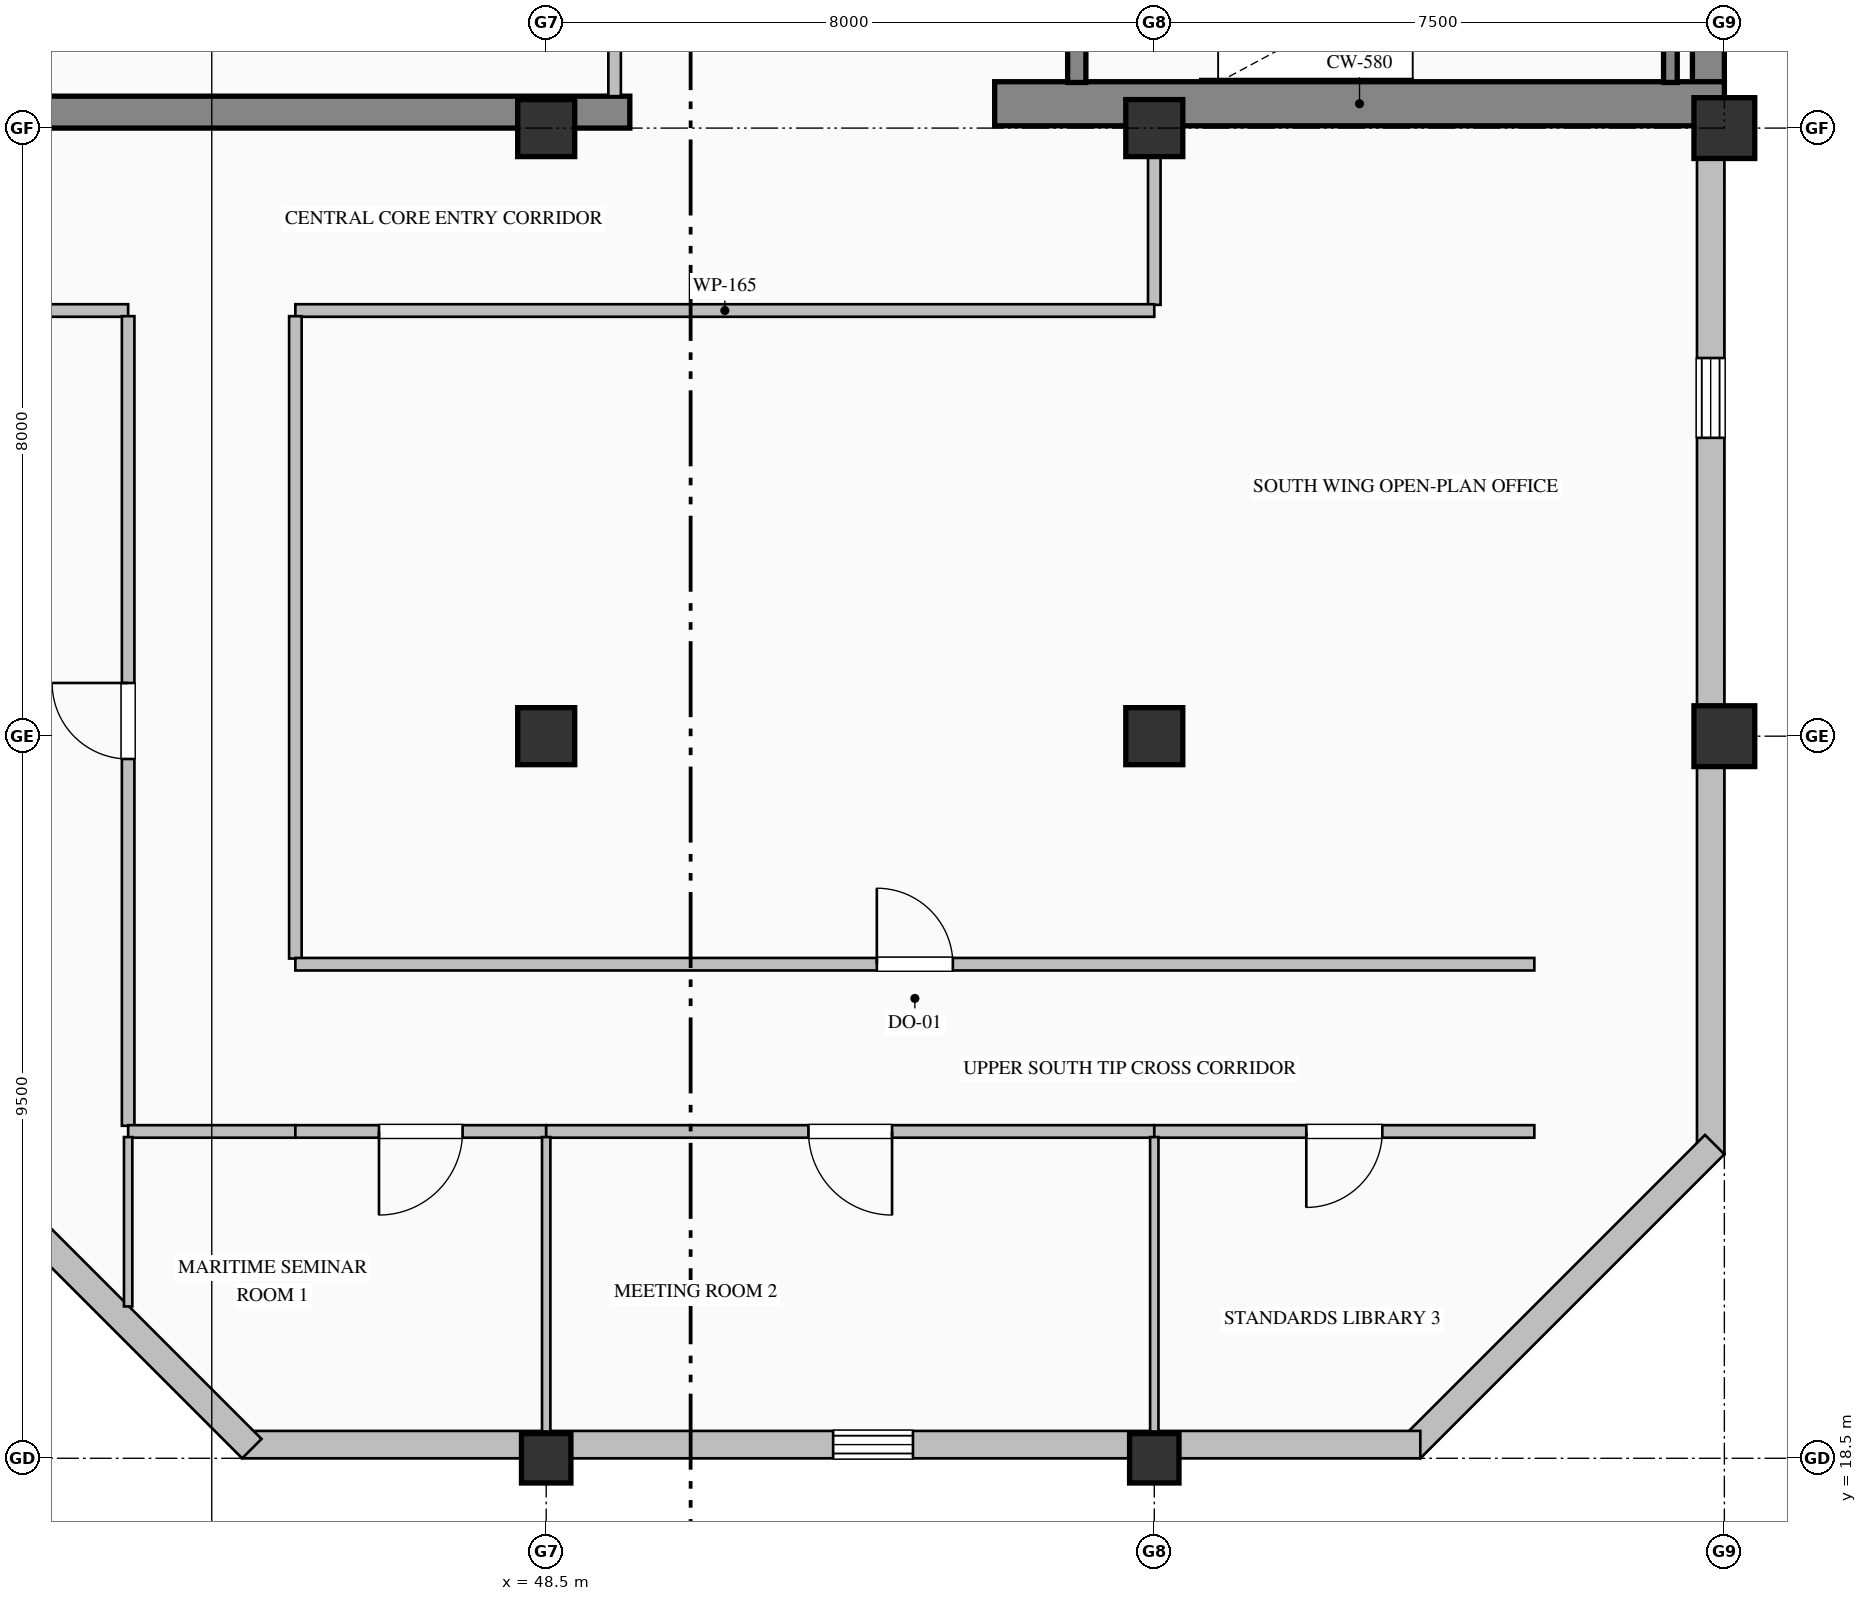
"""IFC4 building model, lengths in metres.
Left out: names, types, materials, properties, quantities, classifications, styles, units other than length and angle.
Written with IfcOpenShell. Run it as: python <this file> out.ifc"""

import sys

from ifc_helpers import new_model, si_unit, direction, frame, frame_2d, origin, origin_2d, place, context, subcontext, project, spatial, rectangle, hollow_rectangle, extrude, element, fill, save


model = new_model("IFC4")
c1 = context("Model", 3, precision=1e-05, world=origin(), true_north=direction((0.0, 1.0)))
c2 = subcontext(c1, "Body", "Model", "MODEL_VIEW")
j1 = project(units=[si_unit("LENGTHUNIT", "METRE"), si_unit("PLANEANGLEUNIT", "RADIAN")], contexts=[c1])
p1 = place(None, origin())
s1 = spatial("IfcSite", under=j1, at=p1, CompositionType="ELEMENT")
p2 = place(p1, origin())
s2 = spatial("IfcBuilding", under=s1, at=p2, CompositionType="ELEMENT")
p3 = place(p2, frame((0.0, 0.0, 303.2)))
s3 = spatial("IfcBuildingStorey", under=s2, at=p3, CompositionType="ELEMENT", Elevation=303.2)
p4 = place(p3, frame((63.79, 36.32, 0.0), z_axis=(0.0, 0.0, 1.0), x_axis=(0.0, 1.0, 0.0)))
e1 = element("IfcWall", 1, at=p4, inside=s3, PredefinedType="SHEAR", context=c2, shape_type="SweptSolid", body=[
    extrude(rectangle(XDim=15.26, YDim=0.42, at=frame_2d((7.63, 0.0))), origin(), (0.0, 0.0, 1.0), 3.785),
])
p5 = place(p3, frame((40.5, 36.21, 0.0), z_axis=(0.0, 0.0, 1.0), x_axis=(1.0, 0.0, 0.0)))
e2 = element("IfcWall", 2, at=p5, inside=s3, PredefinedType="SHEAR", context=c2, shape_type="SweptSolid", body=[
    extrude(rectangle(XDim=9.1, YDim=0.42, at=frame_2d((4.55, 0.0))), origin(), (0.0, 0.0, 1.0), 3.785),
])
p6 = place(p3, frame((54.4, 36.32, 0.0), z_axis=(0.0, 0.0, 1.0), x_axis=(1.0, 0.0, 0.0)))
e3 = element("IfcWall", 3, at=p6, inside=s3, PredefinedType="SHEAR", context=c2, shape_type="SweptSolid", body=[
    extrude(rectangle(XDim=9.6, YDim=0.58, at=frame_2d((4.8, 0.0))), origin(), (0.0, 0.0, 1.0), 4.0),
])
p7 = place(p3, frame((48.5, 18.5, 0.0), z_axis=(0.0, 0.0, 1.0), x_axis=(1.0, 0.0, 0.0)))
e4 = element("IfcColumn", 4, at=p7, inside=s3, PredefinedType="COLUMN", context=c2, shape_type="SweptSolid", body=[
    extrude(hollow_rectangle(XDim=0.65, YDim=0.65, WallThickness=0.028, at=origin_2d()), origin(), (0.0, 0.0, 1.0), 4.0),
])
for number, where, z_axis, x_axis in (
    (5, (48.5, 28.0, 0.0), (0.0, 0.0, 1.0), (1.0, 0.0, 0.0)),
    (6, (48.5, 36.0, 0.0), (0.0, 0.0, 1.0), (1.0, 0.0, 0.0)),
):
    element("IfcColumn", number, at=place(p3, frame(where, z_axis=z_axis, x_axis=x_axis)), inside=s3, PredefinedType="COLUMN", context=c2, shape_type="SweptSolid", body=[
        extrude(rectangle(XDim=0.75, YDim=0.75, at=origin_2d()), origin(), (0.0, 0.0, 1.0), 4.0),
    ])
p8 = place(p3, frame((56.5, 18.5, 0.0), z_axis=(0.0, 0.0, 1.0), x_axis=(1.0, 0.0, 0.0)))
e7 = element("IfcColumn", 7, at=p8, inside=s3, PredefinedType="COLUMN", context=c2, shape_type="SweptSolid", body=[
    extrude(hollow_rectangle(XDim=0.65, YDim=0.65, WallThickness=0.028, at=origin_2d()), origin(), (0.0, 0.0, 1.0), 4.0),
])
for number, where, z_axis, x_axis in (
    (8, (56.5, 28.0, 0.0), (0.0, 0.0, 1.0), (1.0, 0.0, 0.0)),
    (9, (56.5, 36.0, 0.0), (0.0, 0.0, 1.0), (1.0, 0.0, 0.0)),
):
    element("IfcColumn", number, at=place(p3, frame(where, z_axis=z_axis, x_axis=x_axis)), inside=s3, PredefinedType="COLUMN", context=c2, shape_type="SweptSolid", body=[
        extrude(rectangle(XDim=0.75, YDim=0.75, at=origin_2d()), origin(), (0.0, 0.0, 1.0), 4.0),
    ])
for number, where, z_axis, x_axis in (
    (10, (64.0, 28.0, 0.0), (0.0, 0.0, 1.0), (1.0, 0.0, 0.0)),
    (11, (64.0, 36.0, 0.0), (0.0, 0.0, 1.0), (1.0, 0.0, 0.0)),
):
    element("IfcColumn", number, at=place(p3, frame(where, z_axis=z_axis, x_axis=x_axis)), inside=s3, PredefinedType="COLUMN", context=c2, shape_type="SweptSolid", body=[
        extrude(hollow_rectangle(XDim=0.8, YDim=0.8, WallThickness=0.032, at=origin_2d()), origin(), (0.0, 0.0, 1.0), 4.0),
    ])
p9 = place(p3, frame((63.82, 36.05, 0.0), z_axis=(0.0, 0.0, 1.0), x_axis=(0.0, -1.0, 0.0)))
e12 = element("IfcWall", 12, at=p9, inside=s3, PredefinedType="SOLIDWALL", context=c2, shape_type="SweptSolid", body=[
    extrude(rectangle(XDim=13.55, YDim=0.36, at=frame_2d((6.775, 0.0))), origin(), (0.0, 0.0, 1.0), 3.335),
])
p10 = place(p9, frame((3.075, 0.0, 0.8)))
e13 = element("IfcOpeningElement", 13, at=p10, cuts=e12, PredefinedType="OPENING", context=c2, shape_type="SweptSolid", body=[
    extrude(rectangle(XDim=1.05, YDim=2.15, at=frame_2d((0.525, 1.075))), frame((0.0, 0.19, 0.0), z_axis=(0.0, -1.0, 0.0), x_axis=(1.0, 0.0, 0.0)), (0.0, 0.0, 1.0), 0.38),
])
p11 = place(p3, frame((63.873, 22.627, 0.0), z_axis=(0.0, 0.0, 1.0), x_axis=(-0.707106781187, -0.707106781187, 0.0)))
e14 = element("IfcWall", 14, at=p11, inside=s3, PredefinedType="SOLIDWALL", context=c2, shape_type="SweptSolid", body=[
    extrude(rectangle(XDim=5.657, YDim=0.36, at=frame_2d((2.828, 0.0))), origin(), (0.0, 0.0, 1.0), 3.785),
])
p12 = place(p3, frame((60.0, 18.68, 0.0), z_axis=(0.0, 0.0, 1.0), x_axis=(-1.0, 0.0, 0.0)))
e15 = element("IfcWall", 15, at=p12, inside=s3, PredefinedType="SOLIDWALL", context=c2, shape_type="SweptSolid", body=[
    extrude(rectangle(XDim=15.5, YDim=0.36, at=frame_2d((7.75, 0.0))), origin(), (0.0, 0.0, 1.0), 3.335),
])
p13 = place(p12, frame((6.675, 0.0, 0.8)))
e16 = element("IfcOpeningElement", 16, at=p13, cuts=e15, PredefinedType="OPENING", context=c2, shape_type="SweptSolid", body=[
    extrude(rectangle(XDim=1.05, YDim=2.15, at=frame_2d((0.525, 1.075))), frame((0.0, 0.19, 0.0), z_axis=(0.0, -1.0, 0.0), x_axis=(1.0, 0.0, 0.0)), (0.0, 0.0, 1.0), 0.38),
])
p14 = place(p3, frame((44.627, 18.627, 0.0), z_axis=(0.0, 0.0, 1.0), x_axis=(-0.707106781187, 0.707106781187, 0.0)))
e17 = element("IfcWall", 17, at=p14, inside=s3, PredefinedType="SOLIDWALL", context=c2, shape_type="SweptSolid", body=[
    extrude(rectangle(XDim=5.657, YDim=0.36, at=frame_2d((2.828, 0.0))), origin(), (0.0, 0.0, 1.0), 3.785),
])
p15 = place(p3, frame((55.48, 39.75, 0.0), z_axis=(0.0, 0.0, 1.0), x_axis=(0.0, -1.0, 0.0)))
e18 = element("IfcWall", 18, at=p15, inside=s3, PredefinedType="SOLIDWALL", context=c2, shape_type="SweptSolid", body=[
    extrude(rectangle(XDim=3.15, YDim=0.24, at=frame_2d((1.575, 0.0))), origin(), (0.0, 0.0, 1.0), 4.0),
])
p16 = place(p15, frame((1.0, 0.0, 0.0)))
e19 = element("IfcOpeningElement", 19, at=p16, cuts=e18, PredefinedType="OPENING", context=c2, shape_type="SweptSolid", body=[
    extrude(rectangle(XDim=1.15, YDim=2.2, at=frame_2d((0.575, 1.1))), frame((0.0, 0.13, 0.0), z_axis=(0.0, -1.0, 0.0), x_axis=(1.0, 0.0, 0.0)), (0.0, 0.0, 1.0), 0.26),
])
p17 = place(p3, frame((63.29, 36.6, 0.0), z_axis=(0.0, 0.0, 1.0), x_axis=(0.0, 1.0, 0.0)))
e20 = element("IfcWall", 20, at=p17, inside=s3, PredefinedType="SOLIDWALL", context=c2, shape_type="SweptSolid", body=[
    extrude(rectangle(XDim=3.15, YDim=0.18, at=frame_2d((1.575, 0.0))), origin(), (0.0, 0.0, 1.0), 4.0),
])
p18 = place(p3, frame((49.4, 36.42, 0.0), z_axis=(0.0, 0.0, 1.0), x_axis=(0.0, 1.0, 0.0)))
e21 = element("IfcWall", 21, at=p18, inside=s3, PredefinedType="PARTITIONING", context=c2, shape_type="SweptSolid", body=[
    extrude(rectangle(XDim=7.73, YDim=0.165, at=frame_2d((3.865, 0.0))), origin(), (0.0, 0.0, 1.0), 3.027),
])
p19 = place(p18, frame((3.365, 0.0, 0.0)))
e22 = element("IfcOpeningElement", 22, at=p19, cuts=e21, PredefinedType="OPENING", context=c2, shape_type="SweptSolid", body=[
    extrude(rectangle(XDim=1.0, YDim=2.15, at=frame_2d((0.5, 1.075))), frame((0.0, 0.093, 0.0), z_axis=(0.0, -1.0, 0.0), x_axis=(1.0, 0.0, 0.0)), (0.0, 0.0, 1.0), 0.185),
])
p20 = place(p3, frame((56.5, 36.0, 0.0), z_axis=(0.0, 0.0, 1.0), x_axis=(0.0, -1.0, 0.0)))
e23 = element("IfcWall", 23, at=p20, inside=s3, PredefinedType="PARTITIONING", context=c2, shape_type="SweptSolid", body=[
    extrude(rectangle(XDim=2.325, YDim=0.165, at=frame_2d((1.163, 0.0))), origin(), (0.0, 0.0, 1.0), 3.177),
])
p21 = place(p3, frame((56.5, 33.6, 0.0), z_axis=(0.0, 0.0, 1.0), x_axis=(-1.0, 0.0, 0.0)))
e24 = element("IfcWall", 24, at=p21, inside=s3, PredefinedType="PARTITIONING", context=c2, shape_type="SweptSolid", body=[
    extrude(rectangle(XDim=11.3, YDim=0.165, at=frame_2d((5.65, 0.0))), origin(), (0.0, 0.0, 1.0), 3.785),
])
p22 = place(p3, frame((43.0, 33.6, 0.0), z_axis=(0.0, 0.0, 1.0), x_axis=(-1.0, 0.0, 0.0)))
e25 = element("IfcWall", 25, at=p22, inside=s3, PredefinedType="PARTITIONING", context=c2, shape_type="SweptSolid", body=[
    extrude(rectangle(XDim=2.5, YDim=0.165, at=frame_2d((1.25, 0.0))), origin(), (0.0, 0.0, 1.0), 3.785),
])
p23 = place(p3, frame((45.2, 33.525, 0.0), z_axis=(0.0, 0.0, 1.0), x_axis=(0.0, -1.0, 0.0)))
e26 = element("IfcWall", 26, at=p23, inside=s3, PredefinedType="PARTITIONING", context=c2, shape_type="SweptSolid", body=[
    extrude(rectangle(XDim=8.451, YDim=0.165, at=frame_2d((4.226, 0.0))), origin(), (0.0, 0.0, 1.0), 3.785),
])
p24 = place(p3, frame((43.0, 22.875, 0.0), z_axis=(0.0, 0.0, 1.0), x_axis=(0.0, 1.0, 0.0)))
e27 = element("IfcWall", 27, at=p24, inside=s3, PredefinedType="PARTITIONING", context=c2, shape_type="SweptSolid", body=[
    extrude(rectangle(XDim=10.651, YDim=0.165, at=frame_2d((5.325, 0.0))), origin(), (0.0, 0.0, 1.0), 3.785),
])
p25 = place(p24, frame((4.825, 0.0, 0.0)))
e28 = element("IfcOpeningElement", 28, at=p25, cuts=e27, PredefinedType="OPENING", context=c2, shape_type="SweptSolid", body=[
    extrude(rectangle(XDim=1.0, YDim=2.15, at=frame_2d((0.5, 1.075))), frame((0.0, 0.093, 0.0), z_axis=(0.0, -1.0, 0.0), x_axis=(1.0, 0.0, 0.0)), (0.0, 0.0, 1.0), 0.185),
])
p26 = place(p3, frame((45.2, 22.8, 0.0), z_axis=(0.0, 0.0, 1.0), x_axis=(-1.0, 0.0, 0.0)))
e29 = element("IfcWall", 29, at=p26, inside=s3, PredefinedType="PARTITIONING", context=c2, shape_type="SweptSolid", body=[
    extrude(rectangle(XDim=2.2, YDim=0.165, at=frame_2d((1.1, 0.0))), origin(), (0.0, 0.0, 1.0), 3.785),
])
p27 = place(p3, frame((45.2, 25.0, 0.0), z_axis=(0.0, 0.0, 1.0), x_axis=(1.0, 0.0, 0.0)))
e30 = element("IfcWall", 30, at=p27, inside=s3, PredefinedType="PARTITIONING", context=c2, shape_type="SweptSolid", body=[
    extrude(rectangle(XDim=16.3, YDim=0.165, at=frame_2d((8.15, 0.0))), origin(), (0.0, 0.0, 1.0), 3.785),
])
p28 = place(p27, frame((7.65, 0.0, 0.0)))
e31 = element("IfcOpeningElement", 31, at=p28, cuts=e30, PredefinedType="OPENING", context=c2, shape_type="SweptSolid", body=[
    extrude(rectangle(XDim=1.0, YDim=2.15, at=frame_2d((0.5, 1.075))), frame((0.0, 0.093, 0.0), z_axis=(0.0, -1.0, 0.0), x_axis=(1.0, 0.0, 0.0)), (0.0, 0.0, 1.0), 0.185),
])
p29 = place(p3, frame((48.5, 22.8, 0.0), z_axis=(0.0, 0.0, 1.0), x_axis=(-1.0, 0.0, 0.0)))
e32 = element("IfcWall", 32, at=p29, inside=s3, PredefinedType="PARTITIONING", context=c2, shape_type="SweptSolid", body=[
    extrude(rectangle(XDim=3.3, YDim=0.165, at=frame_2d((1.65, 0.0))), origin(), (0.0, 0.0, 1.0), 3.785),
])
p30 = place(p29, frame((1.1, 0.0, 0.0)))
e33 = element("IfcOpeningElement", 33, at=p30, cuts=e32, PredefinedType="OPENING", context=c2, shape_type="SweptSolid", body=[
    extrude(rectangle(XDim=1.1, YDim=2.2, at=frame_2d((0.55, 1.1))), frame((0.0, 0.093, 0.0), z_axis=(0.0, -1.0, 0.0), x_axis=(1.0, 0.0, 0.0)), (0.0, 0.0, 1.0), 0.185),
])
p31 = place(p3, frame((56.5, 22.8, 0.0), z_axis=(0.0, 0.0, 1.0), x_axis=(-1.0, 0.0, 0.0)))
e34 = element("IfcWall", 34, at=p31, inside=s3, PredefinedType="PARTITIONING", context=c2, shape_type="SweptSolid", body=[
    extrude(rectangle(XDim=8.0, YDim=0.165, at=frame_2d((4.0, 0.0))), origin(), (0.0, 0.0, 1.0), 3.785),
])
p32 = place(p31, frame((3.45, 0.0, 0.0)))
e35 = element("IfcOpeningElement", 35, at=p32, cuts=e34, PredefinedType="OPENING", context=c2, shape_type="SweptSolid", body=[
    extrude(rectangle(XDim=1.1, YDim=2.2, at=frame_2d((0.55, 1.1))), frame((0.0, 0.093, 0.0), z_axis=(0.0, -1.0, 0.0), x_axis=(1.0, 0.0, 0.0)), (0.0, 0.0, 1.0), 0.185),
])
p33 = place(p3, frame((61.5, 22.8, 0.0), z_axis=(0.0, 0.0, 1.0), x_axis=(-1.0, 0.0, 0.0)))
e36 = element("IfcWall", 36, at=p33, inside=s3, PredefinedType="PARTITIONING", context=c2, shape_type="SweptSolid", body=[
    extrude(rectangle(XDim=5.0, YDim=0.165, at=frame_2d((2.5, 0.0))), origin(), (0.0, 0.0, 1.0), 3.785),
])
p34 = place(p33, frame((2.0, 0.0, 0.0)))
e37 = element("IfcOpeningElement", 37, at=p34, cuts=e36, PredefinedType="OPENING", context=c2, shape_type="SweptSolid", body=[
    extrude(rectangle(XDim=1.0, YDim=2.15, at=frame_2d((0.5, 1.075))), frame((0.0, 0.093, 0.0), z_axis=(0.0, -1.0, 0.0), x_axis=(1.0, 0.0, 0.0)), (0.0, 0.0, 1.0), 0.185),
])
p35 = place(p3, frame((43.0, 22.726, 0.0), z_axis=(0.0, 0.0, 1.0), x_axis=(0.0, -1.0, 0.0)))
e38 = element("IfcWall", 38, at=p35, inside=s3, PredefinedType="MOVABLE", context=c2, shape_type="SweptSolid", body=[
    extrude(rectangle(XDim=2.228, YDim=0.11, at=frame_2d((1.114, 0.0))), origin(), (0.0, 0.0, 1.0), 3.785),
])
for number, where, z_axis, x_axis in (
    (39, (48.5, 22.726, 0.0), (0.0, 0.0, 1.0), (0.0, -1.0, 0.0)),
    (40, (56.5, 22.726, 0.0), (0.0, 0.0, 1.0), (0.0, -1.0, 0.0)),
):
    element("IfcWall", number, at=place(p3, frame(where, z_axis=z_axis, x_axis=x_axis)), inside=s3, PredefinedType="MOVABLE", context=c2, shape_type="SweptSolid", body=[
        extrude(rectangle(XDim=3.874, YDim=0.11, at=frame_2d((1.937, 0.0))), origin(), (0.0, 0.0, 1.0), 2.977),
    ])
p36 = place(p10, origin())
e41 = element("IfcWindow", 41, at=p36, inside=s3, PartitioningType="SINGLE_PANEL", PredefinedType="WINDOW", context=c2, shape_type="SweptSolid", body=[
    extrude(rectangle(XDim=1.05, YDim=2.15, at=frame_2d((0.525, 1.075))), frame((0.0, 0.15, 0.0), z_axis=(0.0, -1.0, 0.0), x_axis=(1.0, 0.0, 0.0)), (0.0, 0.0, 1.0), 0.06),
])
fill(e13, e41)
p37 = place(p13, origin())
e42 = element("IfcWindow", 42, at=p37, inside=s3, PartitioningType="SINGLE_PANEL", PredefinedType="WINDOW", context=c2, shape_type="SweptSolid", body=[
    extrude(rectangle(XDim=1.05, YDim=2.15, at=frame_2d((0.525, 1.075))), frame((0.0, 0.15, 0.0), z_axis=(0.0, -1.0, 0.0), x_axis=(1.0, 0.0, 0.0)), (0.0, 0.0, 1.0), 0.06),
])
fill(e16, e42)
p38 = place(p28, origin())
e43 = element("IfcDoor", 43, at=p38, inside=s3, OperationType="SINGLE_SWING_LEFT", PredefinedType="DOOR", context=c2, shape_type="SweptSolid", body=[
    extrude(rectangle(XDim=1.0, YDim=2.15, at=frame_2d((0.5, 1.075))), frame((0.0, 0.025, 0.0), z_axis=(0.0, -1.0, 0.0), x_axis=(1.0, 0.0, 0.0)), (0.0, 0.0, 1.0), 0.05),
])
fill(e31, e43)
p39 = place(p25, origin())
e44 = element("IfcDoor", 44, at=p39, inside=s3, OperationType="SINGLE_SWING_RIGHT", PredefinedType="DOOR", context=c2, shape_type="SweptSolid", body=[
    extrude(rectangle(XDim=1.0, YDim=2.15, at=frame_2d((0.5, 1.075))), frame((0.0, 0.025, 0.0), z_axis=(0.0, -1.0, 0.0), x_axis=(1.0, 0.0, 0.0)), (0.0, 0.0, 1.0), 0.05),
])
fill(e28, e44)
p40 = place(p30, origin())
e45 = element("IfcDoor", 45, at=p40, inside=s3, OperationType="SINGLE_SWING_RIGHT", PredefinedType="DOOR", context=c2, shape_type="SweptSolid", body=[
    extrude(rectangle(XDim=1.1, YDim=2.2, at=frame_2d((0.55, 1.1))), frame((0.0, 0.025, 0.0), z_axis=(0.0, -1.0, 0.0), x_axis=(1.0, 0.0, 0.0)), (0.0, 0.0, 1.0), 0.05),
])
fill(e33, e45)
p41 = place(p32, origin())
e46 = element("IfcDoor", 46, at=p41, inside=s3, OperationType="SINGLE_SWING_LEFT", PredefinedType="DOOR", context=c2, shape_type="SweptSolid", body=[
    extrude(rectangle(XDim=1.1, YDim=2.2, at=frame_2d((0.55, 1.1))), frame((0.0, 0.025, 0.0), z_axis=(0.0, -1.0, 0.0), x_axis=(1.0, 0.0, 0.0)), (0.0, 0.0, 1.0), 0.05),
])
fill(e35, e46)
p42 = place(p34, origin())
e47 = element("IfcDoor", 47, at=p42, inside=s3, OperationType="SINGLE_SWING_RIGHT", PredefinedType="DOOR", context=c2, shape_type="SweptSolid", body=[
    extrude(rectangle(XDim=1.0, YDim=2.15, at=frame_2d((0.5, 1.075))), frame((0.0, 0.025, 0.0), z_axis=(0.0, -1.0, 0.0), x_axis=(1.0, 0.0, 0.0)), (0.0, 0.0, 1.0), 0.05),
])
fill(e37, e47)
save(model, sys.argv[1])
